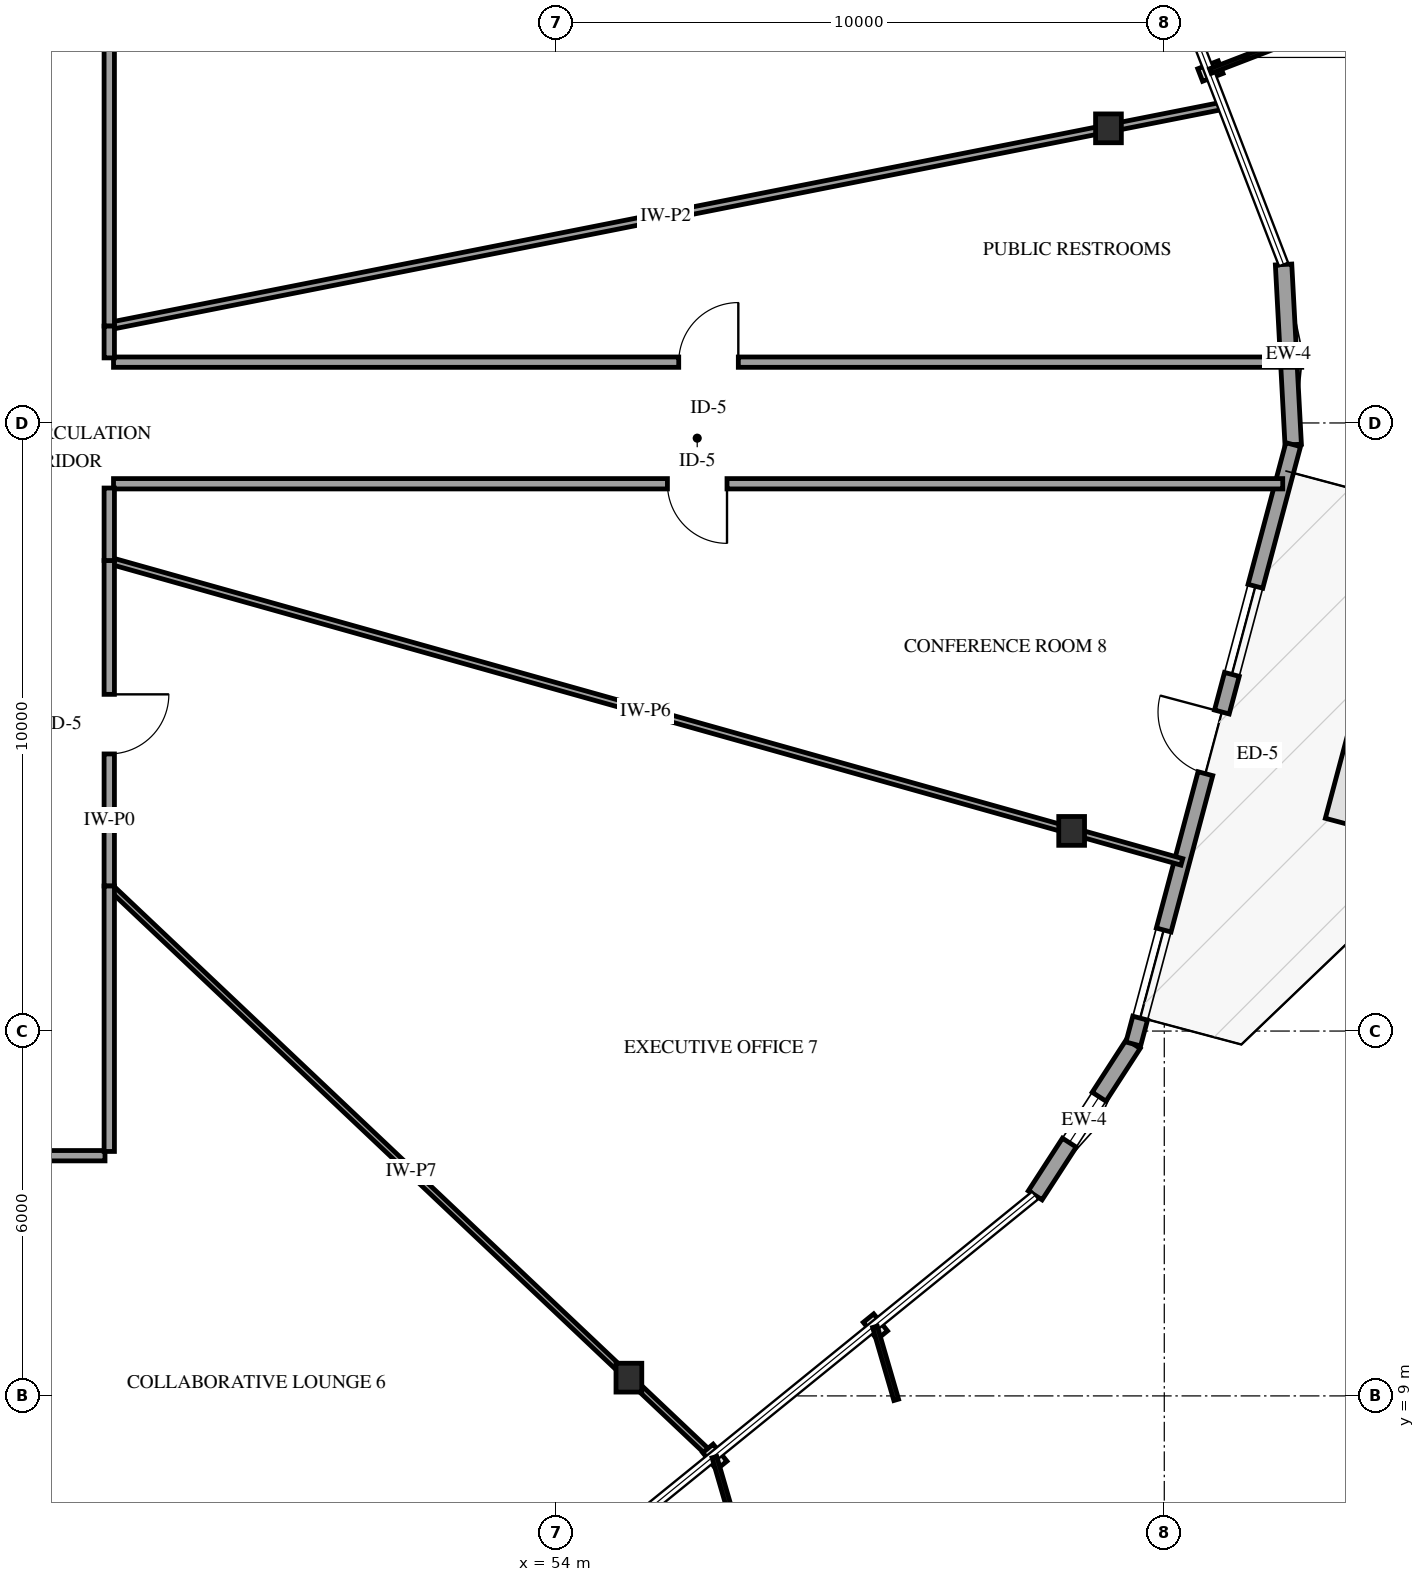
"""IFC4 building model, lengths in metres.
Left out: names, types, materials, properties, quantities, classifications, styles, units other than length and angle.
Written with IfcOpenShell. Run it as: python <this file> out.ifc"""

import sys

from ifc_helpers import new_model, si_unit, direction, frame, frame_2d, origin, origin_2d, place, context, subcontext, project, spatial, rectangle, i_section, extrude, element, fill, save


model = new_model("IFC4")
c1 = context("Model", 3, precision=1e-05, world=origin(), true_north=direction((0.0, 1.0)))
c2 = subcontext(c1, "Body", "Model", "MODEL_VIEW")
j1 = project(units=[si_unit("LENGTHUNIT", "METRE"), si_unit("PLANEANGLEUNIT", "RADIAN")], contexts=[c1])
p1 = place(None, origin())
s1 = spatial("IfcSite", under=j1, at=p1, CompositionType="ELEMENT")
p2 = place(p1, origin())
s2 = spatial("IfcBuilding", under=s1, at=p2, CompositionType="ELEMENT")
p3 = place(p2, frame((0.0, 0.0, 38.6)))
s3 = spatial("IfcBuildingStorey", under=s2, at=p3, CompositionType="ELEMENT", Elevation=38.6)
for number, where, z_axis, x_axis in (
    (1, (63.082, 29.845, 0.0), (0.0, 0.0, 1.0), (1.0, 0.0, 0.0)),
    (2, (55.196, 9.3, 0.0), (0.0, 0.0, 1.0), (1.0, 0.0, 0.0)),
    (3, (62.477, 18.292, 0.0), (0.0, 0.0, 1.0), (1.0, 0.0, 0.0)),
):
    element("IfcColumn", number, at=place(p3, frame(where, z_axis=z_axis, x_axis=x_axis)), inside=s3, PredefinedType="COLUMN", context=c2, shape_type="SweptSolid", body=[
        extrude(i_section(OverallWidth=0.424, OverallDepth=0.474, WebThickness=0.048, FlangeThickness=0.077, FilletRadius=0.038, at=origin_2d()), origin(), (0.0, 0.0, 1.0), 4.0),
    ])
p4 = place(p3, frame((61.877, 12.298, 0.0), z_axis=(0.0, 0.0, 1.0), x_axis=(0.543732321815, 0.839258698027, 0.0)))
e4 = element("IfcWall", 4, at=p4, inside=s3, PredefinedType="SOLIDWALL", context=c2, shape_type="SweptSolid", body=[
    extrude(rectangle(XDim=2.967, YDim=0.27, at=frame_2d((1.483, 0.0))), origin(), (0.0, 0.0, 1.0), 3.079),
])
p5 = place(p4, frame((1.033, 0.0, 0.75)))
e5 = element("IfcOpeningElement", 5, at=p5, cuts=e4, PredefinedType="OPENING", context=c2, shape_type="SweptSolid", body=[
    extrude(rectangle(XDim=0.9, YDim=1.5, at=frame_2d((0.45, 0.75))), frame((0.0, 0.145, 0.0), z_axis=(0.0, -1.0, 0.0), x_axis=(1.0, 0.0, 0.0)), (0.0, 0.0, 1.0), 0.29),
])
p6 = place(p3, frame((66.12, 24.644, 0.0), z_axis=(0.0, 0.0, 1.0), x_axis=(-0.053409730545, 0.998572681723, 0.0)))
e6 = element("IfcWall", 6, at=p6, inside=s3, PredefinedType="SOLIDWALL", context=c2, shape_type="SweptSolid", body=[
    extrude(rectangle(XDim=2.967, YDim=0.27, at=frame_2d((1.483, 0.0))), origin(), (0.0, 0.0, 1.0), 3.079),
])
p7 = place(p3, frame((63.49, 14.787, 0.0), z_axis=(0.0, 0.0, 1.0), x_axis=(0.257827991611, 0.966190833501, 0.0)))
e7 = element("IfcWall", 7, at=p7, inside=s3, PredefinedType="SOLIDWALL", context=c2, shape_type="SweptSolid", body=[
    extrude(rectangle(XDim=10.201, YDim=0.25, at=frame_2d((5.101, 0.0))), origin(), (0.0, 0.0, 1.0), 3.079),
])
p8 = place(p7, frame((4.601, 0.0, 0.0)))
e8 = element("IfcOpeningElement", 8, at=p8, cuts=e7, PredefinedType="OPENING", context=c2, shape_type="SweptSolid", body=[
    extrude(rectangle(XDim=1.05, YDim=2.15, at=frame_2d((0.525, 1.075))), frame((0.0, 0.135, 0.0), z_axis=(0.0, -1.0, 0.0), x_axis=(1.0, 0.0, 0.0)), (0.0, 0.0, 1.0), 0.27),
])
p9 = place(p7, frame((0.44, 0.0, 0.72)))
e9 = element("IfcOpeningElement", 9, at=p9, cuts=e7, PredefinedType="OPENING", context=c2, shape_type="SweptSolid", body=[
    extrude(rectangle(XDim=1.5, YDim=1.7, at=frame_2d((0.75, 0.85))), frame((0.0, 0.135, 0.0), z_axis=(0.0, -1.0, 0.0), x_axis=(1.0, 0.0, 0.0)), (0.0, 0.0, 1.0), 0.27),
])
p10 = place(p7, frame((6.291, 0.0, 0.72)))
e10 = element("IfcOpeningElement", 10, at=p10, cuts=e7, PredefinedType="OPENING", context=c2, shape_type="SweptSolid", body=[
    extrude(rectangle(XDim=1.5, YDim=1.7, at=frame_2d((0.75, 0.85))), frame((0.0, 0.135, 0.0), z_axis=(0.0, -1.0, 0.0), x_axis=(1.0, 0.0, 0.0)), (0.0, 0.0, 1.0), 0.27),
])
p11 = place(p3, frame((46.72, 26.0, 0.0), z_axis=(0.0, 0.0, 1.0), x_axis=(1.0, 0.0, 0.0)))
e11 = element("IfcWall", 11, at=p11, inside=s3, PredefinedType="PARTITIONING", context=c2, shape_type="SweptSolid", body=[
    extrude(rectangle(XDim=19.541, YDim=0.17, at=frame_2d((9.771, 0.0))), origin(), (0.0, 0.0, 1.0), 3.7),
])
p12 = place(p11, frame((9.295, 0.0, 0.0)))
e12 = element("IfcOpeningElement", 12, at=p12, cuts=e11, PredefinedType="OPENING", context=c2, shape_type="SweptSolid", body=[
    extrude(rectangle(XDim=0.98, YDim=2.15, at=frame_2d((0.49, 1.075))), frame((0.0, 0.095, 0.0), z_axis=(0.0, -1.0, 0.0), x_axis=(1.0, 0.0, 0.0)), (0.0, 0.0, 1.0), 0.19),
])
p13 = place(p3, frame((65.948, 24.0, 0.0), z_axis=(0.0, 0.0, 1.0), x_axis=(-1.0, 0.0, 0.0)))
e13 = element("IfcWall", 13, at=p13, inside=s3, PredefinedType="PARTITIONING", context=c2, shape_type="SweptSolid", body=[
    extrude(rectangle(XDim=19.228, YDim=0.17, at=frame_2d((9.614, 0.0))), origin(), (0.0, 0.0, 1.0), 3.7),
])
p14 = place(p13, frame((9.139, 0.0, 0.0)))
e14 = element("IfcOpeningElement", 14, at=p14, cuts=e13, PredefinedType="OPENING", context=c2, shape_type="SweptSolid", body=[
    extrude(rectangle(XDim=0.98, YDim=2.15, at=frame_2d((0.49, 1.075))), frame((0.0, 0.095, 0.0), z_axis=(0.0, -1.0, 0.0), x_axis=(1.0, 0.0, 0.0)), (0.0, 0.0, 1.0), 0.19),
])
p15 = place(p3, frame((46.65, 26.593, 0.0), z_axis=(0.0, 0.0, 1.0), x_axis=(0.980974163768, 0.194138327025, 0.0)))
e15 = element("IfcWall", 15, at=p15, inside=s3, PredefinedType="PARTITIONING", context=c2, shape_type="SweptSolid", body=[
    extrude(rectangle(XDim=18.662, YDim=0.12, at=frame_2d((9.331, 0.0))), origin(), (0.0, 0.0, 1.0), 2.995),
])
p16 = place(p3, frame((46.65, 22.738, 0.0), z_axis=(0.0, 0.0, 1.0), x_axis=(0.962721450878, -0.270494746752, 0.0)))
e16 = element("IfcWall", 16, at=p16, inside=s3, PredefinedType="PARTITIONING", context=c2, shape_type="SweptSolid", body=[
    extrude(rectangle(XDim=18.322, YDim=0.11, at=frame_2d((9.161, 0.0))), origin(), (0.0, 0.0, 1.0), 2.995),
])
p17 = place(p3, frame((46.65, 17.385, 0.0), z_axis=(0.0, 0.0, 1.0), x_axis=(0.726419713392, -0.687251336845, 0.0)))
e17 = element("IfcWall", 17, at=p17, inside=s3, PredefinedType="PARTITIONING", context=c2, shape_type="SweptSolid", body=[
    extrude(rectangle(XDim=13.663, YDim=0.1, at=frame_2d((6.832, 0.0))), origin(), (0.0, 0.0, 1.0), 2.995),
])
p18 = place(p3, frame((46.65, 36.98, 0.0), z_axis=(0.0, 0.0, 1.0), x_axis=(0.0, -1.0, 0.0)))
e18 = element("IfcWall", 18, at=p18, inside=s3, PredefinedType="PARTITIONING", context=c2, shape_type="SweptSolid", body=[
    extrude(rectangle(XDim=10.387, YDim=0.17, at=frame_2d((5.193, 0.0))), origin(), (0.0, 0.0, 1.0), 3.7),
])
p19 = place(p3, frame((46.65, 22.738, 0.0), z_axis=(0.0, 0.0, 1.0), x_axis=(0.0, -1.0, 0.0)))
e19 = element("IfcWall", 19, at=p19, inside=s3, PredefinedType="PARTITIONING", context=c2, shape_type="SweptSolid", body=[
    extrude(rectangle(XDim=5.353, YDim=0.17, at=frame_2d((2.677, 0.0))), origin(), (0.0, 0.0, 1.0), 3.7),
])
p20 = place(p19, frame((2.201, 0.0, 0.0)))
e20 = element("IfcOpeningElement", 20, at=p20, cuts=e19, PredefinedType="OPENING", context=c2, shape_type="SweptSolid", body=[
    extrude(rectangle(XDim=0.98, YDim=2.15, at=frame_2d((0.49, 1.075))), frame((0.0, 0.095, 0.0), z_axis=(0.0, -1.0, 0.0), x_axis=(1.0, 0.0, 0.0)), (0.0, 0.0, 1.0), 0.19),
])
p21 = place(p3, frame((46.58, 12.95, 0.0), z_axis=(0.0, 0.0, 1.0), x_axis=(-1.0, 0.0, 0.0)))
e21 = element("IfcWall", 21, at=p21, inside=s3, PredefinedType="PARTITIONING", context=c2, shape_type="SweptSolid", body=[
    extrude(rectangle(XDim=4.486, YDim=0.17, at=frame_2d((2.243, 0.0))), origin(), (0.0, 0.0, 1.0), 3.7),
])
p22 = place(p21, frame((1.768, 0.0, 0.0)))
e22 = element("IfcOpeningElement", 22, at=p22, cuts=e21, PredefinedType="OPENING", context=c2, shape_type="SweptSolid", body=[
    extrude(rectangle(XDim=0.98, YDim=2.15, at=frame_2d((0.49, 1.075))), frame((0.0, 0.095, 0.0), z_axis=(0.0, -1.0, 0.0), x_axis=(1.0, 0.0, 0.0)), (0.0, 0.0, 1.0), 0.19),
])
p23 = place(p3, frame((46.65, 17.385, 0.0), z_axis=(0.0, 0.0, 1.0), x_axis=(0.0, -1.0, 0.0)))
e23 = element("IfcWall", 23, at=p23, inside=s3, PredefinedType="PARTITIONING", context=c2, shape_type="SweptSolid", body=[
    extrude(rectangle(XDim=4.365, YDim=0.17, at=frame_2d((2.183, 0.0))), origin(), (0.0, 0.0, 1.0), 3.7),
])
p24 = place(p3, frame((46.65, 23.93, 0.0), z_axis=(0.0, 0.0, 1.0), x_axis=(0.0, -1.0, 0.0)))
e24 = element("IfcWall", 24, at=p24, inside=s3, PredefinedType="PARTITIONING", context=c2, shape_type="SweptSolid", body=[
    extrude(rectangle(XDim=1.192, YDim=0.17, at=frame_2d((0.596, 0.0))), origin(), (0.0, 0.0, 1.0), 3.7),
])
p25 = place(p3, frame((46.65, 26.593, 0.0), z_axis=(0.0, 0.0, 1.0), x_axis=(0.0, -1.0, 0.0)))
e25 = element("IfcWall", 25, at=p25, inside=s3, PredefinedType="PARTITIONING", context=c2, shape_type="SweptSolid", body=[
    extrude(rectangle(XDim=0.523, YDim=0.17, at=frame_2d((0.261, 0.0))), origin(), (0.0, 0.0, 1.0), 3.7),
])
p26 = place(p5, origin())
e26 = element("IfcWindow", 26, at=p26, inside=s3, PartitioningType="SINGLE_PANEL", PredefinedType="WINDOW", context=c2, shape_type="SweptSolid", body=[
    extrude(rectangle(XDim=0.9, YDim=1.5, at=frame_2d((0.45, 0.75))), frame((0.0, 0.03, 0.0), z_axis=(0.0, -1.0, 0.0), x_axis=(1.0, 0.0, 0.0)), (0.0, 0.0, 1.0), 0.06),
])
fill(e5, e26)
p27 = place(p8, origin())
e27 = element("IfcDoor", 27, at=p27, inside=s3, OperationType="SINGLE_SWING_RIGHT", PredefinedType="DOOR", context=c2, shape_type="SweptSolid", body=[
    extrude(rectangle(XDim=1.05, YDim=2.15, at=frame_2d((0.525, 1.075))), frame((0.0, 0.025, 0.0), z_axis=(0.0, -1.0, 0.0), x_axis=(1.0, 0.0, 0.0)), (0.0, 0.0, 1.0), 0.05),
])
fill(e8, e27)
p28 = place(p9, origin())
e28 = element("IfcWindow", 28, at=p28, inside=s3, PartitioningType="SINGLE_PANEL", PredefinedType="WINDOW", context=c2, shape_type="SweptSolid", body=[
    extrude(rectangle(XDim=1.5, YDim=1.7, at=frame_2d((0.75, 0.85))), frame((0.0, 0.03, 0.0), z_axis=(0.0, -1.0, 0.0), x_axis=(1.0, 0.0, 0.0)), (0.0, 0.0, 1.0), 0.06),
])
fill(e9, e28)
p29 = place(p10, origin())
e29 = element("IfcWindow", 29, at=p29, inside=s3, PartitioningType="SINGLE_PANEL", PredefinedType="WINDOW", context=c2, shape_type="SweptSolid", body=[
    extrude(rectangle(XDim=1.5, YDim=1.7, at=frame_2d((0.75, 0.85))), frame((0.0, 0.03, 0.0), z_axis=(0.0, -1.0, 0.0), x_axis=(1.0, 0.0, 0.0)), (0.0, 0.0, 1.0), 0.06),
])
fill(e10, e29)
p30 = place(p12, origin())
e30 = element("IfcDoor", 30, at=p30, inside=s3, OperationType="SINGLE_SWING_RIGHT", PredefinedType="DOOR", context=c2, shape_type="SweptSolid", body=[
    extrude(rectangle(XDim=0.98, YDim=2.15, at=frame_2d((0.49, 1.075))), frame((0.0, 0.025, 0.0), z_axis=(0.0, -1.0, 0.0), x_axis=(1.0, 0.0, 0.0)), (0.0, 0.0, 1.0), 0.05),
])
fill(e12, e30)
p31 = place(p14, origin())
e31 = element("IfcDoor", 31, at=p31, inside=s3, OperationType="SINGLE_SWING_LEFT", PredefinedType="DOOR", context=c2, shape_type="SweptSolid", body=[
    extrude(rectangle(XDim=0.98, YDim=2.15, at=frame_2d((0.49, 1.075))), frame((0.0, 0.025, 0.0), z_axis=(0.0, -1.0, 0.0), x_axis=(1.0, 0.0, 0.0)), (0.0, 0.0, 1.0), 0.05),
])
fill(e14, e31)
p32 = place(p20, origin())
e32 = element("IfcDoor", 32, at=p32, inside=s3, OperationType="SINGLE_SWING_LEFT", PredefinedType="DOOR", context=c2, shape_type="SweptSolid", body=[
    extrude(rectangle(XDim=0.98, YDim=2.15, at=frame_2d((0.49, 1.075))), frame((0.0, 0.025, 0.0), z_axis=(0.0, -1.0, 0.0), x_axis=(1.0, 0.0, 0.0)), (0.0, 0.0, 1.0), 0.05),
])
fill(e20, e32)
save(model, sys.argv[1])
